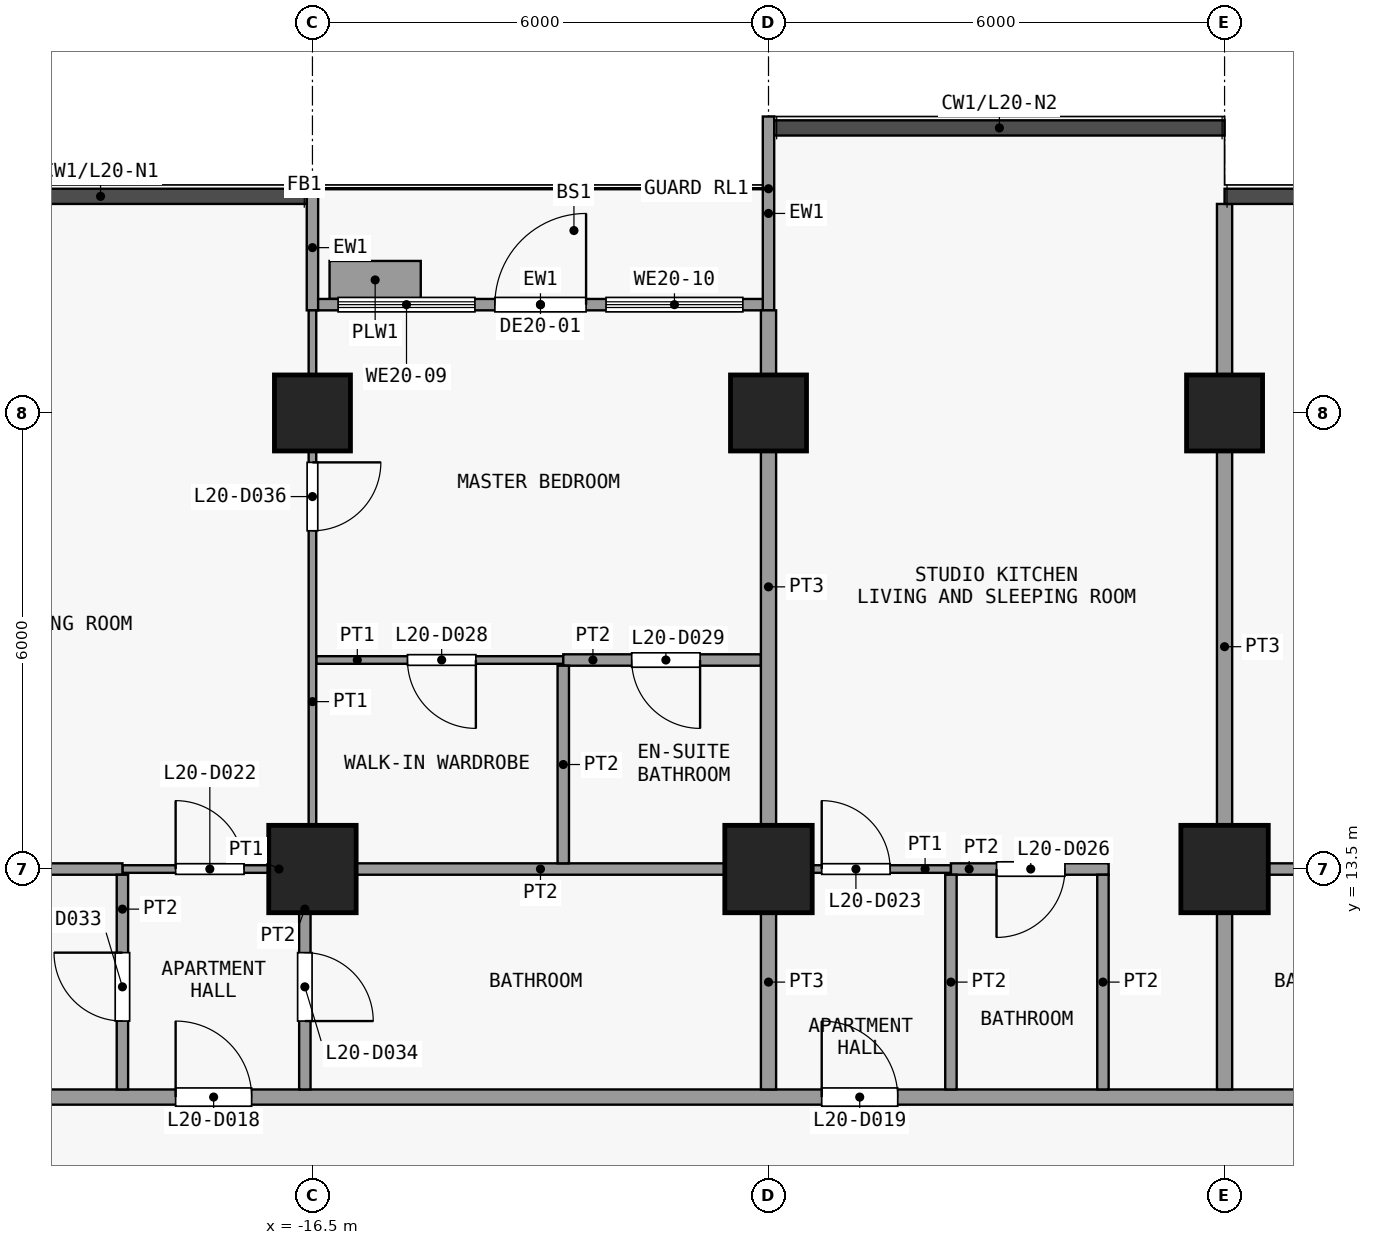
"""IFC4 building model, lengths in metres.
Left out: names, types, materials, properties, quantities, classifications, styles, units other than length and angle.
Written with IfcOpenShell. Run it as: python <this file> out.ifc"""

import sys

from ifc_helpers import new_model, si_unit, direction, frame, frame_2d, origin, origin_2d, place, context, subcontext, project, spatial, rectangle, extrude, element, fill, save


model = new_model("IFC4")
c1 = context("Model", 3, precision=1e-05, world=origin(), true_north=direction((0.0, 1.0)))
c2 = subcontext(c1, "Body", "Model", "MODEL_VIEW")
j1 = project(units=[si_unit("LENGTHUNIT", "METRE"), si_unit("PLANEANGLEUNIT", "RADIAN")], contexts=[c1])
p1 = place(None, origin())
s1 = spatial("IfcSite", under=j1, at=p1, CompositionType="ELEMENT")
p2 = place(p1, origin())
s2 = spatial("IfcBuilding", under=s1, at=p2, CompositionType="ELEMENT")
p3 = place(p2, frame((0.0, 0.0, 84.7)))
s3 = spatial("IfcBuildingStorey", under=s2, at=p3, CompositionType="ELEMENT", Elevation=84.7)
p4 = place(p3, frame((-16.5, 13.5, 0.0), z_axis=(0.0, 0.0, 1.0), x_axis=(1.0, 0.0, 0.0)))
e1 = element("IfcColumn", 1, at=p4, inside=s3, PredefinedType="COLUMN", context=c2, shape_type="SweptSolid", body=[
    extrude(rectangle(XDim=1.15, YDim=1.15, at=origin_2d()), origin(), (0.0, 0.0, 1.0), 3.6),
])
p5 = place(p3, frame((-16.5, 19.5, 0.0), z_axis=(0.0, 0.0, 1.0), x_axis=(1.0, 0.0, 0.0)))
e2 = element("IfcColumn", 2, at=p5, inside=s3, PredefinedType="COLUMN", context=c2, shape_type="SweptSolid", body=[
    extrude(rectangle(XDim=1.0, YDim=1.0, at=origin_2d()), origin(), (0.0, 0.0, 1.0), 3.6),
])
p6 = place(p3, frame((-10.5, 13.5, 0.0), z_axis=(0.0, 0.0, 1.0), x_axis=(1.0, 0.0, 0.0)))
e3 = element("IfcColumn", 3, at=p6, inside=s3, PredefinedType="COLUMN", context=c2, shape_type="SweptSolid", body=[
    extrude(rectangle(XDim=1.15, YDim=1.15, at=origin_2d()), origin(), (0.0, 0.0, 1.0), 3.6),
])
p7 = place(p3, frame((-10.5, 19.5, 0.0), z_axis=(0.0, 0.0, 1.0), x_axis=(1.0, 0.0, 0.0)))
e4 = element("IfcColumn", 4, at=p7, inside=s3, PredefinedType="COLUMN", context=c2, shape_type="SweptSolid", body=[
    extrude(rectangle(XDim=1.0, YDim=1.0, at=origin_2d()), origin(), (0.0, 0.0, 1.0), 3.6),
])
p8 = place(p3, frame((-4.5, 13.5, 0.0), z_axis=(0.0, 0.0, 1.0), x_axis=(1.0, 0.0, 0.0)))
e5 = element("IfcColumn", 5, at=p8, inside=s3, PredefinedType="COLUMN", context=c2, shape_type="SweptSolid", body=[
    extrude(rectangle(XDim=1.15, YDim=1.15, at=origin_2d()), origin(), (0.0, 0.0, 1.0), 3.6),
])
p9 = place(p3, frame((-4.5, 19.5, 0.0), z_axis=(0.0, 0.0, 1.0), x_axis=(1.0, 0.0, 0.0)))
e6 = element("IfcColumn", 6, at=p9, inside=s3, PredefinedType="COLUMN", context=c2, shape_type="SweptSolid", body=[
    extrude(rectangle(XDim=1.0, YDim=1.0, at=origin_2d()), origin(), (0.0, 0.0, 1.0), 3.6),
])
p10 = place(p3, frame((-16.5, 20.85, 0.0), z_axis=(0.0, 0.0, 1.0), x_axis=(0.0, 1.0, 0.0)))
e7 = element("IfcWall", 7, at=p10, inside=s3, PredefinedType="SOLIDWALL", context=c2, shape_type="SweptSolid", body=[
    extrude(rectangle(XDim=1.65, YDim=0.15, at=frame_2d((0.825, 0.0))), origin(), (0.0, 0.0, 1.0), 3.3),
])
p11 = place(p3, frame((-10.5, 20.85, 0.0), z_axis=(0.0, 0.0, 1.0), x_axis=(0.0, 1.0, 0.0)))
e8 = element("IfcWall", 8, at=p11, inside=s3, PredefinedType="SOLIDWALL", context=c2, shape_type="SweptSolid", body=[
    extrude(rectangle(XDim=2.55, YDim=0.15, at=frame_2d((1.275, 0.0))), origin(), (0.0, 0.0, 1.0), 3.3),
])
p12 = place(p3, frame((-16.425, 20.925, 0.0), z_axis=(0.0, 0.0, 1.0), x_axis=(1.0, 0.0, 0.0)))
e9 = element("IfcWall", 9, at=p12, inside=s3, PredefinedType="SOLIDWALL", context=c2, shape_type="SweptSolid", body=[
    extrude(rectangle(XDim=5.85, YDim=0.15, at=frame_2d((2.925, 0.0))), origin(), (0.0, 0.0, 1.0), 3.3),
])
p13 = place(p12, frame((2.325, 0.0, 0.0)))
e10 = element("IfcOpeningElement", 10, at=p13, cuts=e9, PredefinedType="OPENING", context=c2, shape_type="SweptSolid", body=[
    extrude(rectangle(XDim=1.2, YDim=2.4, at=frame_2d((0.6, 1.2))), frame((0.0, 0.085, 0.0), z_axis=(0.0, -1.0, 0.0), x_axis=(1.0, 0.0, 0.0)), (0.0, 0.0, 1.0), 0.17),
])
p14 = place(p12, frame((0.262, 0.0, 0.9)))
e11 = element("IfcOpeningElement", 11, at=p14, cuts=e9, PredefinedType="OPENING", context=c2, shape_type="SweptSolid", body=[
    extrude(rectangle(XDim=1.8, YDim=2.1, at=frame_2d((0.9, 1.05))), frame((0.0, 0.085, 0.0), z_axis=(0.0, -1.0, 0.0), x_axis=(1.0, 0.0, 0.0)), (0.0, 0.0, 1.0), 0.17),
])
p15 = place(p12, frame((3.788, 0.0, 0.9)))
e12 = element("IfcOpeningElement", 12, at=p15, cuts=e9, PredefinedType="OPENING", context=c2, shape_type="SweptSolid", body=[
    extrude(rectangle(XDim=1.8, YDim=2.1, at=frame_2d((0.9, 1.05))), frame((0.0, 0.085, 0.0), z_axis=(0.0, -1.0, 0.0), x_axis=(1.0, 0.0, 0.0)), (0.0, 0.0, 1.0), 0.17),
])
p16 = place(p3, frame((-16.275, 21.25, 0.0), z_axis=(0.0, 0.0, 1.0), x_axis=(1.0, 0.0, 0.0)))
e13 = element("IfcWall", 13, at=p16, inside=s3, PredefinedType="USERDEFINED", context=c2, shape_type="SweptSolid", body=[
    extrude(rectangle(XDim=1.2, YDim=0.5, at=frame_2d((0.6, 0.0))), origin(), (0.0, 0.0, 1.0), 0.9),
])
p17 = place(p3, frame((-23.85, 10.5, 0.0), z_axis=(0.0, 0.0, 1.0), x_axis=(1.0, 0.0, 0.0)))
e14 = element("IfcWall", 14, at=p17, inside=s3, PredefinedType="PARTITIONING", context=c2, shape_type="SweptSolid", body=[
    extrude(rectangle(XDim=49.2, YDim=0.2, at=frame_2d((24.6, 0.0))), origin(), (0.0, 0.0, 1.0), 3.3),
])
p18 = place(p17, frame((5.55, 0.0, 0.0)))
e15 = element("IfcOpeningElement", 15, at=p18, cuts=e14, PredefinedType="OPENING", context=c2, shape_type="SweptSolid", body=[
    extrude(rectangle(XDim=1.0, YDim=2.1, at=frame_2d((0.5, 1.05))), frame((0.0, 0.11, 0.0), z_axis=(0.0, -1.0, 0.0), x_axis=(1.0, 0.0, 0.0)), (0.0, 0.0, 1.0), 0.22),
])
p19 = place(p17, frame((14.05, 0.0, 0.0)))
e16 = element("IfcOpeningElement", 16, at=p19, cuts=e14, PredefinedType="OPENING", context=c2, shape_type="SweptSolid", body=[
    extrude(rectangle(XDim=1.0, YDim=2.1, at=frame_2d((0.5, 1.05))), frame((0.0, 0.11, 0.0), z_axis=(0.0, -1.0, 0.0), x_axis=(1.0, 0.0, 0.0)), (0.0, 0.0, 1.0), 0.22),
])
p20 = place(p17, frame((22.55, 0.0, 0.0)))
e17 = element("IfcOpeningElement", 17, at=p20, cuts=e14, PredefinedType="OPENING", context=c2, shape_type="SweptSolid", body=[
    extrude(rectangle(XDim=1.0, YDim=2.1, at=frame_2d((0.5, 1.05))), frame((0.0, 0.11, 0.0), z_axis=(0.0, -1.0, 0.0), x_axis=(1.0, 0.0, 0.0)), (0.0, 0.0, 1.0), 0.22),
])
p21 = place(p17, frame((43.55, 0.0, 0.0)))
e18 = element("IfcOpeningElement", 18, at=p21, cuts=e14, PredefinedType="OPENING", context=c2, shape_type="SweptSolid", body=[
    extrude(rectangle(XDim=1.0, YDim=2.1, at=frame_2d((0.5, 1.05))), frame((0.0, 0.11, 0.0), z_axis=(0.0, -1.0, 0.0), x_axis=(1.0, 0.0, 0.0)), (0.0, 0.0, 1.0), 0.22),
])
p22 = place(p3, frame((-19.0, 13.5, 0.0), z_axis=(0.0, 0.0, 1.0), x_axis=(1.0, 0.0, 0.0)))
e19 = element("IfcWall", 19, at=p22, inside=s3, PredefinedType="PARTITIONING", context=c2, shape_type="SweptSolid", body=[
    extrude(rectangle(XDim=2.4, YDim=0.1, at=frame_2d((1.2, 0.0))), origin(), (0.0, 0.0, 1.0), 3.3),
])
p23 = place(p22, frame((0.7, 0.0, 0.0)))
e20 = element("IfcOpeningElement", 20, at=p23, cuts=e19, PredefinedType="OPENING", context=c2, shape_type="SweptSolid", body=[
    extrude(rectangle(XDim=0.9, YDim=2.1, at=frame_2d((0.45, 1.05))), frame((0.0, 0.06, 0.0), z_axis=(0.0, -1.0, 0.0), x_axis=(1.0, 0.0, 0.0)), (0.0, 0.0, 1.0), 0.12),
])
p24 = place(p3, frame((-10.5, 13.5, 0.0), z_axis=(0.0, 0.0, 1.0), x_axis=(1.0, 0.0, 0.0)))
e21 = element("IfcWall", 21, at=p24, inside=s3, PredefinedType="PARTITIONING", context=c2, shape_type="SweptSolid", body=[
    extrude(rectangle(XDim=2.4, YDim=0.1, at=frame_2d((1.2, 0.0))), origin(), (0.0, 0.0, 1.0), 3.3),
])
p25 = place(p24, frame((0.7, 0.0, 0.0)))
e22 = element("IfcOpeningElement", 22, at=p25, cuts=e21, PredefinedType="OPENING", context=c2, shape_type="SweptSolid", body=[
    extrude(rectangle(XDim=0.9, YDim=2.1, at=frame_2d((0.45, 1.05))), frame((0.0, 0.06, 0.0), z_axis=(0.0, -1.0, 0.0), x_axis=(1.0, 0.0, 0.0)), (0.0, 0.0, 1.0), 0.12),
])
p26 = place(p3, frame((-23.85, 13.5, 0.0), z_axis=(0.0, 0.0, 1.0), x_axis=(1.0, 0.0, 0.0)))
e23 = element("IfcWall", 23, at=p26, inside=s3, PredefinedType="PARTITIONING", context=c2, shape_type="SweptSolid", body=[
    extrude(rectangle(XDim=4.85, YDim=0.15, at=frame_2d((2.425, 0.0))), origin(), (0.0, 0.0, 1.0), 3.3),
])
p27 = place(p3, frame((-16.5, 13.5, 0.0), z_axis=(0.0, 0.0, 1.0), x_axis=(1.0, 0.0, 0.0)))
e24 = element("IfcWall", 24, at=p27, inside=s3, PredefinedType="PARTITIONING", context=c2, shape_type="SweptSolid", body=[
    extrude(rectangle(XDim=6.0, YDim=0.15, at=frame_2d((3.0, 0.0))), origin(), (0.0, 0.0, 1.0), 3.3),
])
p28 = place(p3, frame((-8.1, 13.5, 0.0), z_axis=(0.0, 0.0, 1.0), x_axis=(1.0, 0.0, 0.0)))
e25 = element("IfcWall", 25, at=p28, inside=s3, PredefinedType="PARTITIONING", context=c2, shape_type="SweptSolid", body=[
    extrude(rectangle(XDim=2.075, YDim=0.15, at=frame_2d((1.038, 0.0))), origin(), (0.0, 0.0, 1.0), 3.3),
])
p29 = place(p28, frame((0.6, 0.0, 0.0)))
e26 = element("IfcOpeningElement", 26, at=p29, cuts=e25, PredefinedType="OPENING", context=c2, shape_type="SweptSolid", body=[
    extrude(rectangle(XDim=0.9, YDim=2.1, at=frame_2d((0.45, 1.05))), frame((0.0, 0.085, 0.0), z_axis=(0.0, -1.0, 0.0), x_axis=(1.0, 0.0, 0.0)), (0.0, 0.0, 1.0), 0.17),
])
p30 = place(p3, frame((-4.4, 13.5, 0.0), z_axis=(0.0, 0.0, 1.0), x_axis=(1.0, 0.0, 0.0)))
e27 = element("IfcWall", 27, at=p30, inside=s3, PredefinedType="PARTITIONING", context=c2, shape_type="SweptSolid", body=[
    extrude(rectangle(XDim=2.4, YDim=0.15, at=frame_2d((1.2, 0.0))), origin(), (0.0, 0.0, 1.0), 3.3),
])
p31 = place(p3, frame((-16.45, 16.25, 0.0), z_axis=(0.0, 0.0, 1.0), x_axis=(1.0, 0.0, 0.0)))
e28 = element("IfcWall", 28, at=p31, inside=s3, PredefinedType="PARTITIONING", context=c2, shape_type="SweptSolid", body=[
    extrude(rectangle(XDim=3.25, YDim=0.1, at=frame_2d((1.625, 0.0))), origin(), (0.0, 0.0, 1.0), 3.3),
])
p32 = place(p31, frame((1.2, 0.0, 0.0)))
e29 = element("IfcOpeningElement", 29, at=p32, cuts=e28, PredefinedType="OPENING", context=c2, shape_type="SweptSolid", body=[
    extrude(rectangle(XDim=0.9, YDim=2.1, at=frame_2d((0.45, 1.05))), frame((0.0, 0.06, 0.0), z_axis=(0.0, -1.0, 0.0), x_axis=(1.0, 0.0, 0.0)), (0.0, 0.0, 1.0), 0.12),
])
p33 = place(p3, frame((-13.2, 16.25, 0.0), z_axis=(0.0, 0.0, 1.0), x_axis=(1.0, 0.0, 0.0)))
e30 = element("IfcWall", 30, at=p33, inside=s3, PredefinedType="PARTITIONING", context=c2, shape_type="SweptSolid", body=[
    extrude(rectangle(XDim=2.6, YDim=0.15, at=frame_2d((1.3, 0.0))), origin(), (0.0, 0.0, 1.0), 3.3),
])
p34 = place(p33, frame((0.9, 0.0, 0.0)))
e31 = element("IfcOpeningElement", 31, at=p34, cuts=e30, PredefinedType="OPENING", context=c2, shape_type="SweptSolid", body=[
    extrude(rectangle(XDim=0.9, YDim=2.1, at=frame_2d((0.45, 1.05))), frame((0.0, 0.085, 0.0), z_axis=(0.0, -1.0, 0.0), x_axis=(1.0, 0.0, 0.0)), (0.0, 0.0, 1.0), 0.17),
])
p35 = place(p3, frame((-19.0, 10.6, 0.0), z_axis=(0.0, 0.0, 1.0), x_axis=(0.0, 1.0, 0.0)))
e32 = element("IfcWall", 32, at=p35, inside=s3, PredefinedType="PARTITIONING", context=c2, shape_type="SweptSolid", body=[
    extrude(rectangle(XDim=2.825, YDim=0.15, at=frame_2d((1.413, 0.0))), origin(), (0.0, 0.0, 1.0), 3.3),
])
p36 = place(p35, frame((0.9, 0.0, 0.0)))
e33 = element("IfcOpeningElement", 33, at=p36, cuts=e32, PredefinedType="OPENING", context=c2, shape_type="SweptSolid", body=[
    extrude(rectangle(XDim=0.9, YDim=2.1, at=frame_2d((0.45, 1.05))), frame((0.0, 0.085, 0.0), z_axis=(0.0, -1.0, 0.0), x_axis=(1.0, 0.0, 0.0)), (0.0, 0.0, 1.0), 0.17),
])
p37 = place(p3, frame((-16.6, 10.6, 0.0), z_axis=(0.0, 0.0, 1.0), x_axis=(0.0, 1.0, 0.0)))
e34 = element("IfcWall", 34, at=p37, inside=s3, PredefinedType="PARTITIONING", context=c2, shape_type="SweptSolid", body=[
    extrude(rectangle(XDim=2.825, YDim=0.15, at=frame_2d((1.413, 0.0))), origin(), (0.0, 0.0, 1.0), 3.3),
])
p38 = place(p37, frame((0.9, 0.0, 0.0)))
e35 = element("IfcOpeningElement", 35, at=p38, cuts=e34, PredefinedType="OPENING", context=c2, shape_type="SweptSolid", body=[
    extrude(rectangle(XDim=0.9, YDim=2.1, at=frame_2d((0.45, 1.05))), frame((0.0, 0.085, 0.0), z_axis=(0.0, -1.0, 0.0), x_axis=(1.0, 0.0, 0.0)), (0.0, 0.0, 1.0), 0.17),
])
p39 = place(p3, frame((-16.5, 13.575, 0.0), z_axis=(0.0, 0.0, 1.0), x_axis=(0.0, 1.0, 0.0)))
e36 = element("IfcWall", 36, at=p39, inside=s3, PredefinedType="PARTITIONING", context=c2, shape_type="SweptSolid", body=[
    extrude(rectangle(XDim=7.275, YDim=0.1, at=frame_2d((3.638, 0.0))), origin(), (0.0, 0.0, 1.0), 3.3),
])
p40 = place(p39, frame((4.375, 0.0, 0.0)))
e37 = element("IfcOpeningElement", 37, at=p40, cuts=e36, PredefinedType="OPENING", context=c2, shape_type="SweptSolid", body=[
    extrude(rectangle(XDim=0.9, YDim=2.1, at=frame_2d((0.45, 1.05))), frame((0.0, 0.06, 0.0), z_axis=(0.0, -1.0, 0.0), x_axis=(1.0, 0.0, 0.0)), (0.0, 0.0, 1.0), 0.12),
])
p41 = place(p3, frame((-13.2, 13.575, 0.0), z_axis=(0.0, 0.0, 1.0), x_axis=(0.0, 1.0, 0.0)))
e38 = element("IfcWall", 38, at=p41, inside=s3, PredefinedType="PARTITIONING", context=c2, shape_type="SweptSolid", body=[
    extrude(rectangle(XDim=2.6, YDim=0.15, at=frame_2d((1.3, 0.0))), origin(), (0.0, 0.0, 1.0), 3.3),
])
p42 = place(p3, frame((-10.5, 10.6, 0.0), z_axis=(0.0, 0.0, 1.0), x_axis=(0.0, 1.0, 0.0)))
e39 = element("IfcWall", 39, at=p42, inside=s3, PredefinedType="PARTITIONING", context=c2, shape_type="SweptSolid", body=[
    extrude(rectangle(XDim=2.825, YDim=0.2, at=frame_2d((1.413, 0.0))), origin(), (0.0, 0.0, 1.0), 3.3),
])
p43 = place(p3, frame((-10.5, 13.575, 0.0), z_axis=(0.0, 0.0, 1.0), x_axis=(0.0, 1.0, 0.0)))
e40 = element("IfcWall", 40, at=p43, inside=s3, PredefinedType="PARTITIONING", context=c2, shape_type="SweptSolid", body=[
    extrude(rectangle(XDim=7.275, YDim=0.2, at=frame_2d((3.638, 0.0))), origin(), (0.0, 0.0, 1.0), 3.3),
])
for number, where, z_axis, x_axis in (
    (41, (-8.1, 10.6, 0.0), (0.0, 0.0, 1.0), (0.0, 1.0, 0.0)),
    (42, (-6.1, 10.6, 0.0), (0.0, 0.0, 1.0), (0.0, 1.0, 0.0)),
):
    element("IfcWall", number, at=place(p3, frame(where, z_axis=z_axis, x_axis=x_axis)), inside=s3, PredefinedType="PARTITIONING", context=c2, shape_type="SweptSolid", body=[
        extrude(rectangle(XDim=2.825, YDim=0.15, at=frame_2d((1.413, 0.0))), origin(), (0.0, 0.0, 1.0), 3.3),
    ])
p44 = place(p3, frame((-4.5, 10.6, 0.0), z_axis=(0.0, 0.0, 1.0), x_axis=(0.0, 1.0, 0.0)))
e43 = element("IfcWall", 43, at=p44, inside=s3, PredefinedType="PARTITIONING", context=c2, shape_type="SweptSolid", body=[
    extrude(rectangle(XDim=11.65, YDim=0.2, at=frame_2d((5.825, 0.0))), origin(), (0.0, 0.0, 1.0), 3.3),
])
p45 = place(p13, origin())
e44 = element("IfcDoor", 44, at=p45, inside=s3, OperationType="SINGLE_SWING_RIGHT", PredefinedType="DOOR", context=c2, shape_type="SweptSolid", body=[
    extrude(rectangle(XDim=1.2, YDim=2.4, at=frame_2d((0.6, 1.2))), frame((0.0, 0.025, 0.0), z_axis=(0.0, -1.0, 0.0), x_axis=(1.0, 0.0, 0.0)), (0.0, 0.0, 1.0), 0.05),
])
fill(e10, e44)
p46 = place(p14, origin())
e45 = element("IfcWindow", 45, at=p46, inside=s3, PartitioningType="SINGLE_PANEL", PredefinedType="WINDOW", context=c2, shape_type="SweptSolid", body=[
    extrude(rectangle(XDim=1.8, YDim=2.1, at=frame_2d((0.9, 1.05))), frame((0.0, 0.03, 0.0), z_axis=(0.0, -1.0, 0.0), x_axis=(1.0, 0.0, 0.0)), (0.0, 0.0, 1.0), 0.06),
])
fill(e11, e45)
p47 = place(p15, origin())
e46 = element("IfcWindow", 46, at=p47, inside=s3, PartitioningType="SINGLE_PANEL", PredefinedType="WINDOW", context=c2, shape_type="SweptSolid", body=[
    extrude(rectangle(XDim=1.8, YDim=2.1, at=frame_2d((0.9, 1.05))), frame((0.0, 0.03, 0.0), z_axis=(0.0, -1.0, 0.0), x_axis=(1.0, 0.0, 0.0)), (0.0, 0.0, 1.0), 0.06),
])
fill(e12, e46)
p48 = place(p18, origin())
e47 = element("IfcDoor", 47, at=p48, inside=s3, OperationType="SINGLE_SWING_RIGHT", PredefinedType="DOOR", context=c2, shape_type="SweptSolid", body=[
    extrude(rectangle(XDim=1.0, YDim=2.1, at=frame_2d((0.5, 1.05))), frame((0.0, 0.025, 0.0), z_axis=(0.0, -1.0, 0.0), x_axis=(1.0, 0.0, 0.0)), (0.0, 0.0, 1.0), 0.05),
])
fill(e15, e47)
p49 = place(p19, origin())
e48 = element("IfcDoor", 48, at=p49, inside=s3, OperationType="SINGLE_SWING_RIGHT", PredefinedType="DOOR", context=c2, shape_type="SweptSolid", body=[
    extrude(rectangle(XDim=1.0, YDim=2.1, at=frame_2d((0.5, 1.05))), frame((0.0, 0.025, 0.0), z_axis=(0.0, -1.0, 0.0), x_axis=(1.0, 0.0, 0.0)), (0.0, 0.0, 1.0), 0.05),
])
fill(e16, e48)
p50 = place(p23, origin())
e49 = element("IfcDoor", 49, at=p50, inside=s3, OperationType="SINGLE_SWING_RIGHT", PredefinedType="DOOR", context=c2, shape_type="SweptSolid", body=[
    extrude(rectangle(XDim=0.9, YDim=2.1, at=frame_2d((0.45, 1.05))), frame((0.0, 0.025, 0.0), z_axis=(0.0, -1.0, 0.0), x_axis=(1.0, 0.0, 0.0)), (0.0, 0.0, 1.0), 0.05),
])
fill(e20, e49)
p51 = place(p25, origin())
e50 = element("IfcDoor", 50, at=p51, inside=s3, OperationType="SINGLE_SWING_RIGHT", PredefinedType="DOOR", context=c2, shape_type="SweptSolid", body=[
    extrude(rectangle(XDim=0.9, YDim=2.1, at=frame_2d((0.45, 1.05))), frame((0.0, 0.025, 0.0), z_axis=(0.0, -1.0, 0.0), x_axis=(1.0, 0.0, 0.0)), (0.0, 0.0, 1.0), 0.05),
])
fill(e22, e50)
p52 = place(p29, origin())
e51 = element("IfcDoor", 51, at=p52, inside=s3, OperationType="SINGLE_SWING_LEFT", PredefinedType="DOOR", context=c2, shape_type="SweptSolid", body=[
    extrude(rectangle(XDim=0.9, YDim=2.1, at=frame_2d((0.45, 1.05))), frame((0.0, 0.025, 0.0), z_axis=(0.0, -1.0, 0.0), x_axis=(1.0, 0.0, 0.0)), (0.0, 0.0, 1.0), 0.05),
])
fill(e26, e51)
p53 = place(p32, origin())
e52 = element("IfcDoor", 52, at=p53, inside=s3, OperationType="SINGLE_SWING_RIGHT", PredefinedType="DOOR", context=c2, shape_type="SweptSolid", body=[
    extrude(rectangle(XDim=0.9, YDim=2.1, at=frame_2d((0.45, 1.05))), frame((0.0, 0.025, 0.0), z_axis=(0.0, -1.0, 0.0), x_axis=(1.0, 0.0, 0.0)), (0.0, 0.0, 1.0), 0.05),
])
fill(e29, e52)
p54 = place(p34, origin())
e53 = element("IfcDoor", 53, at=p54, inside=s3, OperationType="SINGLE_SWING_RIGHT", PredefinedType="DOOR", context=c2, shape_type="SweptSolid", body=[
    extrude(rectangle(XDim=0.9, YDim=2.1, at=frame_2d((0.45, 1.05))), frame((0.0, 0.025, 0.0), z_axis=(0.0, -1.0, 0.0), x_axis=(1.0, 0.0, 0.0)), (0.0, 0.0, 1.0), 0.05),
])
fill(e31, e53)
p55 = place(p36, origin())
e54 = element("IfcDoor", 54, at=p55, inside=s3, OperationType="SINGLE_SWING_LEFT", PredefinedType="DOOR", context=c2, shape_type="SweptSolid", body=[
    extrude(rectangle(XDim=0.9, YDim=2.1, at=frame_2d((0.45, 1.05))), frame((0.0, 0.025, 0.0), z_axis=(0.0, -1.0, 0.0), x_axis=(1.0, 0.0, 0.0)), (0.0, 0.0, 1.0), 0.05),
])
fill(e33, e54)
p56 = place(p38, origin())
e55 = element("IfcDoor", 55, at=p56, inside=s3, OperationType="SINGLE_SWING_LEFT", PredefinedType="DOOR", context=c2, shape_type="SweptSolid", body=[
    extrude(rectangle(XDim=0.9, YDim=2.1, at=frame_2d((0.45, 1.05))), frame((0.0, 0.025, 0.0), z_axis=(0.0, -1.0, 0.0), x_axis=(1.0, 0.0, 0.0)), (0.0, 0.0, 1.0), 0.05),
])
fill(e35, e55)
p57 = place(p40, origin())
e56 = element("IfcDoor", 56, at=p57, inside=s3, OperationType="SINGLE_SWING_RIGHT", PredefinedType="DOOR", context=c2, shape_type="SweptSolid", body=[
    extrude(rectangle(XDim=0.9, YDim=2.1, at=frame_2d((0.45, 1.05))), frame((0.0, 0.025, 0.0), z_axis=(0.0, -1.0, 0.0), x_axis=(1.0, 0.0, 0.0)), (0.0, 0.0, 1.0), 0.05),
])
fill(e37, e56)
save(model, sys.argv[1])
